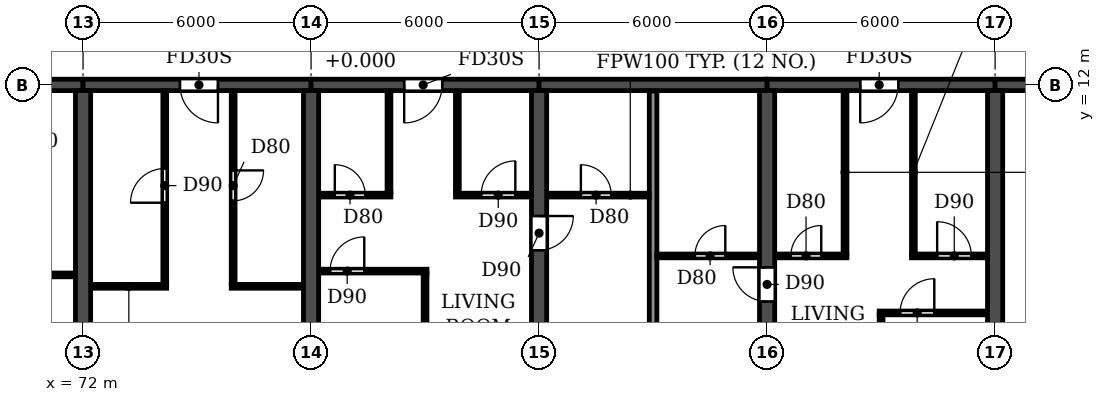
"""IFC4 building model, lengths in metres.
Left out: names, types, materials, properties, quantities, classifications, styles, units other than length and angle.
Written with IfcOpenShell. Run it as: python <this file> out.ifc"""

import sys

from ifc_helpers import new_model, si_unit, direction, frame, frame_2d, origin, place, context, subcontext, project, spatial, rectangle, extrude, element, fill, save


model = new_model("IFC4")
c1 = context("Model", 3, precision=1e-05, world=origin(), true_north=direction((0.0, 1.0)))
c2 = subcontext(c1, "Body", "Model", "MODEL_VIEW")
j1 = project(units=[si_unit("LENGTHUNIT", "METRE"), si_unit("PLANEANGLEUNIT", "RADIAN")], contexts=[c1])
p1 = place(None, origin())
s1 = spatial("IfcSite", under=j1, at=p1, CompositionType="ELEMENT")
p2 = place(p1, origin())
s2 = spatial("IfcBuilding", under=s1, at=p2, CompositionType="ELEMENT")
p3 = place(p2, frame((0.0, 0.0, 23.4)))
s3 = spatial("IfcBuildingStorey", under=s2, at=p3, CompositionType="ELEMENT", Elevation=23.4)
for number, where, z_axis, x_axis in (
    (1, (72.0, 0.2, 0.0), (0.0, 0.0, 1.0), (0.0, 1.0, 0.0)),
    (2, (78.0, 0.2, 0.0), (0.0, 0.0, 1.0), (0.0, 1.0, 0.0)),
):
    element("IfcWall", number, at=place(p3, frame(where, z_axis=z_axis, x_axis=x_axis)), inside=s3, PredefinedType="SHEAR", context=c2, shape_type="SweptSolid", body=[
        extrude(rectangle(XDim=11.65, YDim=0.4, at=frame_2d((5.825, 0.0))), origin(), (0.0, 0.0, 1.0), 3.05),
    ])
p4 = place(p3, frame((84.0, 0.2, 0.0), z_axis=(0.0, 0.0, 1.0), x_axis=(0.0, 1.0, 0.0)))
e3 = element("IfcWall", 3, at=p4, inside=s3, PredefinedType="SHEAR", context=c2, shape_type="SweptSolid", body=[
    extrude(rectangle(XDim=11.65, YDim=0.4, at=frame_2d((5.825, 0.0))), origin(), (0.0, 0.0, 1.0), 3.05),
])
p5 = place(p4, frame((7.45, 0.0, 0.0)))
e4 = element("IfcOpeningElement", 4, at=p5, cuts=e3, PredefinedType="OPENING", context=c2, shape_type="SweptSolid", body=[
    extrude(rectangle(XDim=0.9, YDim=2.1, at=frame_2d((0.45, 1.05))), frame((0.0, 0.21, 0.0), z_axis=(0.0, -1.0, 0.0), x_axis=(1.0, 0.0, 0.0)), (0.0, 0.0, 1.0), 0.42),
])
p6 = place(p3, frame((90.0, 0.2, 0.0), z_axis=(0.0, 0.0, 1.0), x_axis=(0.0, 1.0, 0.0)))
e5 = element("IfcWall", 5, at=p6, inside=s3, PredefinedType="SHEAR", context=c2, shape_type="SweptSolid", body=[
    extrude(rectangle(XDim=11.65, YDim=0.4, at=frame_2d((5.825, 0.0))), origin(), (0.0, 0.0, 1.0), 3.05),
])
p7 = place(p6, frame((6.1, 0.0, 0.0)))
e6 = element("IfcOpeningElement", 6, at=p7, cuts=e5, PredefinedType="OPENING", context=c2, shape_type="SweptSolid", body=[
    extrude(rectangle(XDim=0.9, YDim=2.1, at=frame_2d((0.45, 1.05))), frame((0.0, 0.21, 0.0), z_axis=(0.0, -1.0, 0.0), x_axis=(1.0, 0.0, 0.0)), (0.0, 0.0, 1.0), 0.42),
])
p8 = place(p3, frame((96.0, 0.2, 0.0), z_axis=(0.0, 0.0, 1.0), x_axis=(0.0, 1.0, 0.0)))
e7 = element("IfcWall", 7, at=p8, inside=s3, PredefinedType="SHEAR", context=c2, shape_type="SweptSolid", body=[
    extrude(rectangle(XDim=11.65, YDim=0.4, at=frame_2d((5.825, 0.0))), origin(), (0.0, 0.0, 1.0), 3.05),
])
p9 = place(p3, frame((66.0, 12.0, 0.0), z_axis=(0.0, 0.0, 1.0), x_axis=(1.0, 0.0, 0.0)))
e8 = element("IfcWall", 8, at=p9, inside=s3, PredefinedType="SHEAR", context=c2, shape_type="SweptSolid", body=[
    extrude(rectangle(XDim=6.0, YDim=0.3, at=frame_2d((3.0, 0.0))), origin(), (0.0, 0.0, 1.0), 2.45),
])
p10 = place(p9, frame((2.45, 0.0, 0.0)))
e9 = element("IfcOpeningElement", 9, at=p10, cuts=e8, PredefinedType="OPENING", context=c2, shape_type="SweptSolid", body=[
    extrude(rectangle(XDim=1.0, YDim=2.1, at=frame_2d((0.5, 1.05))), frame((0.0, 0.16, 0.0), z_axis=(0.0, -1.0, 0.0), x_axis=(1.0, 0.0, 0.0)), (0.0, 0.0, 1.0), 0.32),
])
p11 = place(p3, frame((72.0, 12.0, 0.0), z_axis=(0.0, 0.0, 1.0), x_axis=(1.0, 0.0, 0.0)))
e10 = element("IfcWall", 10, at=p11, inside=s3, PredefinedType="SHEAR", context=c2, shape_type="SweptSolid", body=[
    extrude(rectangle(XDim=6.0, YDim=0.3, at=frame_2d((3.0, 0.0))), origin(), (0.0, 0.0, 1.0), 2.45),
])
p12 = place(p11, frame((2.55, 0.0, 0.0)))
e11 = element("IfcOpeningElement", 11, at=p12, cuts=e10, PredefinedType="OPENING", context=c2, shape_type="SweptSolid", body=[
    extrude(rectangle(XDim=1.0, YDim=2.1, at=frame_2d((0.5, 1.05))), frame((0.0, 0.16, 0.0), z_axis=(0.0, -1.0, 0.0), x_axis=(1.0, 0.0, 0.0)), (0.0, 0.0, 1.0), 0.32),
])
p13 = place(p3, frame((78.0, 12.0, 0.0), z_axis=(0.0, 0.0, 1.0), x_axis=(1.0, 0.0, 0.0)))
e12 = element("IfcWall", 12, at=p13, inside=s3, PredefinedType="SHEAR", context=c2, shape_type="SweptSolid", body=[
    extrude(rectangle(XDim=6.0, YDim=0.3, at=frame_2d((3.0, 0.0))), origin(), (0.0, 0.0, 1.0), 2.45),
])
p14 = place(p13, frame((2.45, 0.0, 0.0)))
e13 = element("IfcOpeningElement", 13, at=p14, cuts=e12, PredefinedType="OPENING", context=c2, shape_type="SweptSolid", body=[
    extrude(rectangle(XDim=1.0, YDim=2.1, at=frame_2d((0.5, 1.05))), frame((0.0, 0.16, 0.0), z_axis=(0.0, -1.0, 0.0), x_axis=(1.0, 0.0, 0.0)), (0.0, 0.0, 1.0), 0.32),
])
p15 = place(p3, frame((84.0, 12.0, 0.0), z_axis=(0.0, 0.0, 1.0), x_axis=(1.0, 0.0, 0.0)))
e14 = element("IfcWall", 14, at=p15, inside=s3, PredefinedType="SHEAR", context=c2, shape_type="SweptSolid", body=[
    extrude(rectangle(XDim=6.0, YDim=0.3, at=frame_2d((3.0, 0.0))), origin(), (0.0, 0.0, 1.0), 2.45),
])
p16 = place(p3, frame((90.0, 12.0, 0.0), z_axis=(0.0, 0.0, 1.0), x_axis=(1.0, 0.0, 0.0)))
e15 = element("IfcWall", 15, at=p16, inside=s3, PredefinedType="SHEAR", context=c2, shape_type="SweptSolid", body=[
    extrude(rectangle(XDim=6.0, YDim=0.3, at=frame_2d((3.0, 0.0))), origin(), (0.0, 0.0, 1.0), 2.45),
])
p17 = place(p16, frame((2.45, 0.0, 0.0)))
e16 = element("IfcOpeningElement", 16, at=p17, cuts=e15, PredefinedType="OPENING", context=c2, shape_type="SweptSolid", body=[
    extrude(rectangle(XDim=1.0, YDim=2.1, at=frame_2d((0.5, 1.05))), frame((0.0, 0.16, 0.0), z_axis=(0.0, -1.0, 0.0), x_axis=(1.0, 0.0, 0.0)), (0.0, 0.0, 1.0), 0.32),
])
p18 = place(p3, frame((96.0, 12.0, 0.0), z_axis=(0.0, 0.0, 1.0), x_axis=(1.0, 0.0, 0.0)))
e17 = element("IfcWall", 17, at=p18, inside=s3, PredefinedType="SHEAR", context=c2, shape_type="SweptSolid", body=[
    extrude(rectangle(XDim=5.8, YDim=0.3, at=frame_2d((2.9, 0.0))), origin(), (0.0, 0.0, 1.0), 2.45),
])
p19 = place(p18, frame((2.5, 0.0, 0.0)))
e18 = element("IfcOpeningElement", 18, at=p19, cuts=e17, PredefinedType="OPENING", context=c2, shape_type="SweptSolid", body=[
    extrude(rectangle(XDim=1.0, YDim=2.1, at=frame_2d((0.5, 1.05))), frame((0.0, 0.16, 0.0), z_axis=(0.0, -1.0, 0.0), x_axis=(1.0, 0.0, 0.0)), (0.0, 0.0, 1.0), 0.32),
])
p20 = place(p3, frame((87.0, 0.06, 0.0), z_axis=(0.0, 0.0, 1.0), x_axis=(0.0, 1.0, 0.0)))
e19 = element("IfcWall", 19, at=p20, inside=s3, PredefinedType="PARTITIONING", context=c2, shape_type="SweptSolid", body=[
    extrude(rectangle(XDim=11.78, YDim=0.2, at=frame_2d((5.89, 0.0))), origin(), (0.0, 0.0, 1.0), 3.05),
])
p21 = place(p3, frame((92.95, 6.0, 0.0), z_axis=(0.0, 0.0, 1.0), x_axis=(1.0, 0.0, 0.0)))
e20 = element("IfcWall", 20, at=p21, inside=s3, PredefinedType="PARTITIONING", context=c2, shape_type="SweptSolid", body=[
    extrude(rectangle(XDim=2.84, YDim=0.1, at=frame_2d((1.42, 0.0))), origin(), (0.0, 0.0, 1.0), 3.05),
])
p22 = place(p21, frame((0.55, 0.0, 0.0)))
e21 = element("IfcOpeningElement", 21, at=p22, cuts=e20, PredefinedType="OPENING", context=c2, shape_type="SweptSolid", body=[
    extrude(rectangle(XDim=0.9, YDim=2.1, at=frame_2d((0.45, 1.05))), frame((0.0, 0.06, 0.0), z_axis=(0.0, -1.0, 0.0), x_axis=(1.0, 0.0, 0.0)), (0.0, 0.0, 1.0), 0.12),
])
p23 = place(p3, frame((72.21, 6.7, 0.0), z_axis=(0.0, 0.0, 1.0), x_axis=(1.0, 0.0, 0.0)))
e22 = element("IfcWall", 22, at=p23, inside=s3, PredefinedType="PARTITIONING", context=c2, shape_type="SweptSolid", body=[
    extrude(rectangle(XDim=1.99, YDim=0.1, at=frame_2d((0.995, 0.0))), origin(), (0.0, 0.0, 1.0), 3.05),
])
p24 = place(p3, frame((75.9, 6.7, 0.0), z_axis=(0.0, 0.0, 1.0), x_axis=(1.0, 0.0, 0.0)))
e23 = element("IfcWall", 23, at=p24, inside=s3, PredefinedType="PARTITIONING", context=c2, shape_type="SweptSolid", body=[
    extrude(rectangle(XDim=1.89, YDim=0.1, at=frame_2d((0.945, 0.0))), origin(), (0.0, 0.0, 1.0), 3.05),
])
p25 = place(p3, frame((69.8, 7.0, 0.0), z_axis=(0.0, 0.0, 1.0), x_axis=(1.0, 0.0, 0.0)))
e24 = element("IfcWall", 24, at=p25, inside=s3, PredefinedType="PARTITIONING", context=c2, shape_type="SweptSolid", body=[
    extrude(rectangle(XDim=1.99, YDim=0.1, at=frame_2d((0.995, 0.0))), origin(), (0.0, 0.0, 1.0), 3.05),
])
p26 = place(p3, frame((78.21, 7.1, 0.0), z_axis=(0.0, 0.0, 1.0), x_axis=(1.0, 0.0, 0.0)))
e25 = element("IfcWall", 25, at=p26, inside=s3, PredefinedType="PARTITIONING", context=c2, shape_type="SweptSolid", body=[
    extrude(rectangle(XDim=2.84, YDim=0.1, at=frame_2d((1.42, 0.0))), origin(), (0.0, 0.0, 1.0), 3.05),
])
p27 = place(p26, frame((0.29, 0.0, 0.0)))
e26 = element("IfcOpeningElement", 26, at=p27, cuts=e25, PredefinedType="OPENING", context=c2, shape_type="SweptSolid", body=[
    extrude(rectangle(XDim=0.9, YDim=2.1, at=frame_2d((0.45, 1.05))), frame((0.0, 0.06, 0.0), z_axis=(0.0, -1.0, 0.0), x_axis=(1.0, 0.0, 0.0)), (0.0, 0.0, 1.0), 0.12),
])
p28 = place(p3, frame((87.1, 7.5, 0.0), z_axis=(0.0, 0.0, 1.0), x_axis=(1.0, 0.0, 0.0)))
e27 = element("IfcWall", 27, at=p28, inside=s3, PredefinedType="PARTITIONING", context=c2, shape_type="SweptSolid", body=[
    extrude(rectangle(XDim=2.69, YDim=0.1, at=frame_2d((1.345, 0.0))), origin(), (0.0, 0.0, 1.0), 3.05),
])
p29 = place(p28, frame((1.0, 0.0, 0.0)))
e28 = element("IfcOpeningElement", 28, at=p29, cuts=e27, PredefinedType="OPENING", context=c2, shape_type="SweptSolid", body=[
    extrude(rectangle(XDim=0.8, YDim=2.1, at=frame_2d((0.4, 1.05))), frame((0.0, 0.06, 0.0), z_axis=(0.0, -1.0, 0.0), x_axis=(1.0, 0.0, 0.0)), (0.0, 0.0, 1.0), 0.12),
])
p30 = place(p3, frame((90.21, 7.5, 0.0), z_axis=(0.0, 0.0, 1.0), x_axis=(1.0, 0.0, 0.0)))
e29 = element("IfcWall", 29, at=p30, inside=s3, PredefinedType="PARTITIONING", context=c2, shape_type="SweptSolid", body=[
    extrude(rectangle(XDim=1.89, YDim=0.1, at=frame_2d((0.945, 0.0))), origin(), (0.0, 0.0, 1.0), 3.05),
])
p31 = place(p30, frame((0.415, 0.0, 0.0)))
e30 = element("IfcOpeningElement", 30, at=p31, cuts=e29, PredefinedType="OPENING", context=c2, shape_type="SweptSolid", body=[
    extrude(rectangle(XDim=0.8, YDim=2.1, at=frame_2d((0.4, 1.05))), frame((0.0, 0.06, 0.0), z_axis=(0.0, -1.0, 0.0), x_axis=(1.0, 0.0, 0.0)), (0.0, 0.0, 1.0), 0.12),
])
p32 = place(p3, frame((93.8, 7.5, 0.0), z_axis=(0.0, 0.0, 1.0), x_axis=(1.0, 0.0, 0.0)))
e31 = element("IfcWall", 31, at=p32, inside=s3, PredefinedType="PARTITIONING", context=c2, shape_type="SweptSolid", body=[
    extrude(rectangle(XDim=1.99, YDim=0.1, at=frame_2d((0.995, 0.0))), origin(), (0.0, 0.0, 1.0), 3.05),
])
p33 = place(p32, frame((0.675, 0.0, 0.0)))
e32 = element("IfcOpeningElement", 32, at=p33, cuts=e31, PredefinedType="OPENING", context=c2, shape_type="SweptSolid", body=[
    extrude(rectangle(XDim=0.9, YDim=2.1, at=frame_2d((0.45, 1.05))), frame((0.0, 0.06, 0.0), z_axis=(0.0, -1.0, 0.0), x_axis=(1.0, 0.0, 0.0)), (0.0, 0.0, 1.0), 0.12),
])
p34 = place(p3, frame((78.21, 9.1, 0.0), z_axis=(0.0, 0.0, 1.0), x_axis=(1.0, 0.0, 0.0)))
e33 = element("IfcWall", 33, at=p34, inside=s3, PredefinedType="PARTITIONING", context=c2, shape_type="SweptSolid", body=[
    extrude(rectangle(XDim=1.89, YDim=0.1, at=frame_2d((0.945, 0.0))), origin(), (0.0, 0.0, 1.0), 3.05),
])
p35 = place(p34, frame((0.415, 0.0, 0.0)))
e34 = element("IfcOpeningElement", 34, at=p35, cuts=e33, PredefinedType="OPENING", context=c2, shape_type="SweptSolid", body=[
    extrude(rectangle(XDim=0.8, YDim=2.1, at=frame_2d((0.4, 1.05))), frame((0.0, 0.06, 0.0), z_axis=(0.0, -1.0, 0.0), x_axis=(1.0, 0.0, 0.0)), (0.0, 0.0, 1.0), 0.12),
])
p36 = place(p3, frame((81.8, 9.1, 0.0), z_axis=(0.0, 0.0, 1.0), x_axis=(1.0, 0.0, 0.0)))
e35 = element("IfcWall", 35, at=p36, inside=s3, PredefinedType="PARTITIONING", context=c2, shape_type="SweptSolid", body=[
    extrude(rectangle(XDim=1.99, YDim=0.1, at=frame_2d((0.995, 0.0))), origin(), (0.0, 0.0, 1.0), 3.05),
])
p37 = place(p36, frame((0.675, 0.0, 0.0)))
e36 = element("IfcOpeningElement", 36, at=p37, cuts=e35, PredefinedType="OPENING", context=c2, shape_type="SweptSolid", body=[
    extrude(rectangle(XDim=0.9, YDim=2.1, at=frame_2d((0.45, 1.05))), frame((0.0, 0.06, 0.0), z_axis=(0.0, -1.0, 0.0), x_axis=(1.0, 0.0, 0.0)), (0.0, 0.0, 1.0), 0.12),
])
p38 = place(p3, frame((84.21, 9.1, 0.0), z_axis=(0.0, 0.0, 1.0), x_axis=(1.0, 0.0, 0.0)))
e37 = element("IfcWall", 37, at=p38, inside=s3, PredefinedType="PARTITIONING", context=c2, shape_type="SweptSolid", body=[
    extrude(rectangle(XDim=2.69, YDim=0.1, at=frame_2d((1.345, 0.0))), origin(), (0.0, 0.0, 1.0), 3.05),
])
p39 = place(p38, frame((0.89, 0.0, 0.0)))
e38 = element("IfcOpeningElement", 38, at=p39, cuts=e37, PredefinedType="OPENING", context=c2, shape_type="SweptSolid", body=[
    extrude(rectangle(XDim=0.8, YDim=2.1, at=frame_2d((0.4, 1.05))), frame((0.0, 0.06, 0.0), z_axis=(0.0, -1.0, 0.0), x_axis=(1.0, 0.0, 0.0)), (0.0, 0.0, 1.0), 0.12),
])
p40 = place(p3, frame((74.15, 6.75, 0.0), z_axis=(0.0, 0.0, 1.0), x_axis=(0.0, 1.0, 0.0)))
e39 = element("IfcWall", 39, at=p40, inside=s3, PredefinedType="PARTITIONING", context=c2, shape_type="SweptSolid", body=[
    extrude(rectangle(XDim=5.09, YDim=0.1, at=frame_2d((2.545, 0.0))), origin(), (0.0, 0.0, 1.0), 3.05),
])
p41 = place(p40, frame((2.15, 0.0, 0.0)))
e40 = element("IfcOpeningElement", 40, at=p41, cuts=e39, PredefinedType="OPENING", context=c2, shape_type="SweptSolid", body=[
    extrude(rectangle(XDim=0.9, YDim=2.1, at=frame_2d((0.45, 1.05))), frame((0.0, 0.06, 0.0), z_axis=(0.0, -1.0, 0.0), x_axis=(1.0, 0.0, 0.0)), (0.0, 0.0, 1.0), 0.12),
])
p42 = place(p3, frame((75.95, 6.75, 0.0), z_axis=(0.0, 0.0, 1.0), x_axis=(0.0, 1.0, 0.0)))
e41 = element("IfcWall", 41, at=p42, inside=s3, PredefinedType="PARTITIONING", context=c2, shape_type="SweptSolid", body=[
    extrude(rectangle(XDim=5.09, YDim=0.1, at=frame_2d((2.545, 0.0))), origin(), (0.0, 0.0, 1.0), 3.05),
])
p43 = place(p42, frame((2.2, 0.0, 0.0)))
e42 = element("IfcOpeningElement", 42, at=p43, cuts=e41, PredefinedType="OPENING", context=c2, shape_type="SweptSolid", body=[
    extrude(rectangle(XDim=0.8, YDim=2.1, at=frame_2d((0.4, 1.05))), frame((0.0, 0.06, 0.0), z_axis=(0.0, -1.0, 0.0), x_axis=(1.0, 0.0, 0.0)), (0.0, 0.0, 1.0), 0.12),
])
p44 = place(p3, frame((80.05, 9.15, 0.0), z_axis=(0.0, 0.0, 1.0), x_axis=(0.0, 1.0, 0.0)))
e43 = element("IfcWall", 43, at=p44, inside=s3, PredefinedType="PARTITIONING", context=c2, shape_type="SweptSolid", body=[
    extrude(rectangle(XDim=2.69, YDim=0.1, at=frame_2d((1.345, 0.0))), origin(), (0.0, 0.0, 1.0), 3.05),
])
p45 = place(p3, frame((81.0, 0.06, 0.0), z_axis=(0.0, 0.0, 1.0), x_axis=(0.0, 1.0, 0.0)))
e44 = element("IfcWall", 44, at=p45, inside=s3, PredefinedType="PARTITIONING", context=c2, shape_type="SweptSolid", body=[
    extrude(rectangle(XDim=6.99, YDim=0.1, at=frame_2d((3.495, 0.0))), origin(), (0.0, 0.0, 1.0), 3.05),
])
p46 = place(p3, frame((81.85, 9.15, 0.0), z_axis=(0.0, 0.0, 1.0), x_axis=(0.0, 1.0, 0.0)))
e45 = element("IfcWall", 45, at=p46, inside=s3, PredefinedType="PARTITIONING", context=c2, shape_type="SweptSolid", body=[
    extrude(rectangle(XDim=2.69, YDim=0.1, at=frame_2d((1.345, 0.0))), origin(), (0.0, 0.0, 1.0), 3.05),
])
p47 = place(p3, frame((92.05, 7.55, 0.0), z_axis=(0.0, 0.0, 1.0), x_axis=(0.0, 1.0, 0.0)))
e46 = element("IfcWall", 46, at=p47, inside=s3, PredefinedType="PARTITIONING", context=c2, shape_type="SweptSolid", body=[
    extrude(rectangle(XDim=4.29, YDim=0.1, at=frame_2d((2.145, 0.0))), origin(), (0.0, 0.0, 1.0), 3.05),
])
p48 = place(p3, frame((93.0, 0.06, 0.0), z_axis=(0.0, 0.0, 1.0), x_axis=(0.0, 1.0, 0.0)))
e47 = element("IfcWall", 47, at=p48, inside=s3, PredefinedType="PARTITIONING", context=c2, shape_type="SweptSolid", body=[
    extrude(rectangle(XDim=5.89, YDim=0.1, at=frame_2d((2.945, 0.0))), origin(), (0.0, 0.0, 1.0), 3.05),
])
p49 = place(p3, frame((93.85, 7.55, 0.0), z_axis=(0.0, 0.0, 1.0), x_axis=(0.0, 1.0, 0.0)))
e48 = element("IfcWall", 48, at=p49, inside=s3, PredefinedType="PARTITIONING", context=c2, shape_type="SweptSolid", body=[
    extrude(rectangle(XDim=4.29, YDim=0.1, at=frame_2d((2.145, 0.0))), origin(), (0.0, 0.0, 1.0), 3.05),
])
p50 = place(p41, origin())
e49 = element("IfcDoor", 49, at=p50, inside=s3, OperationType="SINGLE_SWING_LEFT", PredefinedType="DOOR", context=c2, shape_type="SweptSolid", body=[
    extrude(rectangle(XDim=0.9, YDim=2.1, at=frame_2d((0.45, 1.05))), frame((0.0, 0.025, 0.0), z_axis=(0.0, -1.0, 0.0), x_axis=(1.0, 0.0, 0.0)), (0.0, 0.0, 1.0), 0.05),
])
fill(e40, e49)
p51 = place(p12, frame((1.0, 0.0, 0.0), z_axis=(0.0, 0.0, 1.0), x_axis=(-1.0, 0.0, 0.0)))
e50 = element("IfcDoor", 50, at=p51, inside=s3, OperationType="SINGLE_SWING_LEFT", PredefinedType="DOOR", context=c2, shape_type="SweptSolid", body=[
    extrude(rectangle(XDim=1.0, YDim=2.1, at=frame_2d((0.5, 1.05))), frame((0.0, 0.025, 0.0), z_axis=(0.0, -1.0, 0.0), x_axis=(1.0, 0.0, 0.0)), (0.0, 0.0, 1.0), 0.05),
])
fill(e11, e50)
p52 = place(p43, frame((0.8, 0.0, 0.0), z_axis=(0.0, 0.0, 1.0), x_axis=(-1.0, 0.0, 0.0)))
e51 = element("IfcDoor", 51, at=p52, inside=s3, OperationType="SINGLE_SWING_LEFT", PredefinedType="DOOR", context=c2, shape_type="SweptSolid", body=[
    extrude(rectangle(XDim=0.8, YDim=2.1, at=frame_2d((0.4, 1.05))), frame((0.0, 0.025, 0.0), z_axis=(0.0, -1.0, 0.0), x_axis=(1.0, 0.0, 0.0)), (0.0, 0.0, 1.0), 0.05),
])
fill(e42, e51)
p53 = place(p39, origin())
e52 = element("IfcDoor", 52, at=p53, inside=s3, OperationType="SINGLE_SWING_LEFT", PredefinedType="DOOR", context=c2, shape_type="SweptSolid", body=[
    extrude(rectangle(XDim=0.8, YDim=2.1, at=frame_2d((0.4, 1.05))), frame((0.0, 0.025, 0.0), z_axis=(0.0, -1.0, 0.0), x_axis=(1.0, 0.0, 0.0)), (0.0, 0.0, 1.0), 0.05),
])
fill(e38, e52)
p54 = place(p27, origin())
e53 = element("IfcDoor", 53, at=p54, inside=s3, OperationType="SINGLE_SWING_RIGHT", PredefinedType="DOOR", context=c2, shape_type="SweptSolid", body=[
    extrude(rectangle(XDim=0.9, YDim=2.1, at=frame_2d((0.45, 1.05))), frame((0.0, 0.025, 0.0), z_axis=(0.0, -1.0, 0.0), x_axis=(1.0, 0.0, 0.0)), (0.0, 0.0, 1.0), 0.05),
])
fill(e26, e53)
p55 = place(p35, origin())
e54 = element("IfcDoor", 54, at=p55, inside=s3, OperationType="SINGLE_SWING_LEFT", PredefinedType="DOOR", context=c2, shape_type="SweptSolid", body=[
    extrude(rectangle(XDim=0.8, YDim=2.1, at=frame_2d((0.4, 1.05))), frame((0.0, 0.025, 0.0), z_axis=(0.0, -1.0, 0.0), x_axis=(1.0, 0.0, 0.0)), (0.0, 0.0, 1.0), 0.05),
])
fill(e34, e54)
p56 = place(p14, frame((1.0, 0.0, 0.0), z_axis=(0.0, 0.0, 1.0), x_axis=(-1.0, 0.0, 0.0)))
e55 = element("IfcDoor", 55, at=p56, inside=s3, OperationType="SINGLE_SWING_RIGHT", PredefinedType="DOOR", context=c2, shape_type="SweptSolid", body=[
    extrude(rectangle(XDim=1.0, YDim=2.1, at=frame_2d((0.5, 1.05))), frame((0.0, 0.025, 0.0), z_axis=(0.0, -1.0, 0.0), x_axis=(1.0, 0.0, 0.0)), (0.0, 0.0, 1.0), 0.05),
])
fill(e13, e55)
p57 = place(p37, origin())
e56 = element("IfcDoor", 56, at=p57, inside=s3, OperationType="SINGLE_SWING_RIGHT", PredefinedType="DOOR", context=c2, shape_type="SweptSolid", body=[
    extrude(rectangle(XDim=0.9, YDim=2.1, at=frame_2d((0.45, 1.05))), frame((0.0, 0.025, 0.0), z_axis=(0.0, -1.0, 0.0), x_axis=(1.0, 0.0, 0.0)), (0.0, 0.0, 1.0), 0.05),
])
fill(e36, e56)
p58 = place(p5, frame((0.9, 0.0, 0.0), z_axis=(0.0, 0.0, 1.0), x_axis=(-1.0, 0.0, 0.0)))
e57 = element("IfcDoor", 57, at=p58, inside=s3, OperationType="SINGLE_SWING_LEFT", PredefinedType="DOOR", context=c2, shape_type="SweptSolid", body=[
    extrude(rectangle(XDim=0.9, YDim=2.1, at=frame_2d((0.45, 1.05))), frame((0.0, 0.025, 0.0), z_axis=(0.0, -1.0, 0.0), x_axis=(1.0, 0.0, 0.0)), (0.0, 0.0, 1.0), 0.05),
])
fill(e4, e57)
p59 = place(p29, origin())
e58 = element("IfcDoor", 58, at=p59, inside=s3, OperationType="SINGLE_SWING_RIGHT", PredefinedType="DOOR", context=c2, shape_type="SweptSolid", body=[
    extrude(rectangle(XDim=0.8, YDim=2.1, at=frame_2d((0.4, 1.05))), frame((0.0, 0.025, 0.0), z_axis=(0.0, -1.0, 0.0), x_axis=(1.0, 0.0, 0.0)), (0.0, 0.0, 1.0), 0.05),
])
fill(e28, e58)
p60 = place(p7, origin())
e59 = element("IfcDoor", 59, at=p60, inside=s3, OperationType="SINGLE_SWING_RIGHT", PredefinedType="DOOR", context=c2, shape_type="SweptSolid", body=[
    extrude(rectangle(XDim=0.9, YDim=2.1, at=frame_2d((0.45, 1.05))), frame((0.0, 0.025, 0.0), z_axis=(0.0, -1.0, 0.0), x_axis=(1.0, 0.0, 0.0)), (0.0, 0.0, 1.0), 0.05),
])
fill(e6, e59)
p61 = place(p31, origin())
e60 = element("IfcDoor", 60, at=p61, inside=s3, OperationType="SINGLE_SWING_RIGHT", PredefinedType="DOOR", context=c2, shape_type="SweptSolid", body=[
    extrude(rectangle(XDim=0.8, YDim=2.1, at=frame_2d((0.4, 1.05))), frame((0.0, 0.025, 0.0), z_axis=(0.0, -1.0, 0.0), x_axis=(1.0, 0.0, 0.0)), (0.0, 0.0, 1.0), 0.05),
])
fill(e30, e60)
p62 = place(p17, frame((1.0, 0.0, 0.0), z_axis=(0.0, 0.0, 1.0), x_axis=(-1.0, 0.0, 0.0)))
e61 = element("IfcDoor", 61, at=p62, inside=s3, OperationType="SINGLE_SWING_RIGHT", PredefinedType="DOOR", context=c2, shape_type="SweptSolid", body=[
    extrude(rectangle(XDim=1.0, YDim=2.1, at=frame_2d((0.5, 1.05))), frame((0.0, 0.025, 0.0), z_axis=(0.0, -1.0, 0.0), x_axis=(1.0, 0.0, 0.0)), (0.0, 0.0, 1.0), 0.05),
])
fill(e16, e61)
p63 = place(p22, origin())
e62 = element("IfcDoor", 62, at=p63, inside=s3, OperationType="SINGLE_SWING_RIGHT", PredefinedType="DOOR", context=c2, shape_type="SweptSolid", body=[
    extrude(rectangle(XDim=0.9, YDim=2.1, at=frame_2d((0.45, 1.05))), frame((0.0, 0.025, 0.0), z_axis=(0.0, -1.0, 0.0), x_axis=(1.0, 0.0, 0.0)), (0.0, 0.0, 1.0), 0.05),
])
fill(e21, e62)
p64 = place(p33, origin())
e63 = element("IfcDoor", 63, at=p64, inside=s3, OperationType="SINGLE_SWING_LEFT", PredefinedType="DOOR", context=c2, shape_type="SweptSolid", body=[
    extrude(rectangle(XDim=0.9, YDim=2.1, at=frame_2d((0.45, 1.05))), frame((0.0, 0.025, 0.0), z_axis=(0.0, -1.0, 0.0), x_axis=(1.0, 0.0, 0.0)), (0.0, 0.0, 1.0), 0.05),
])
fill(e32, e63)
save(model, sys.argv[1])
